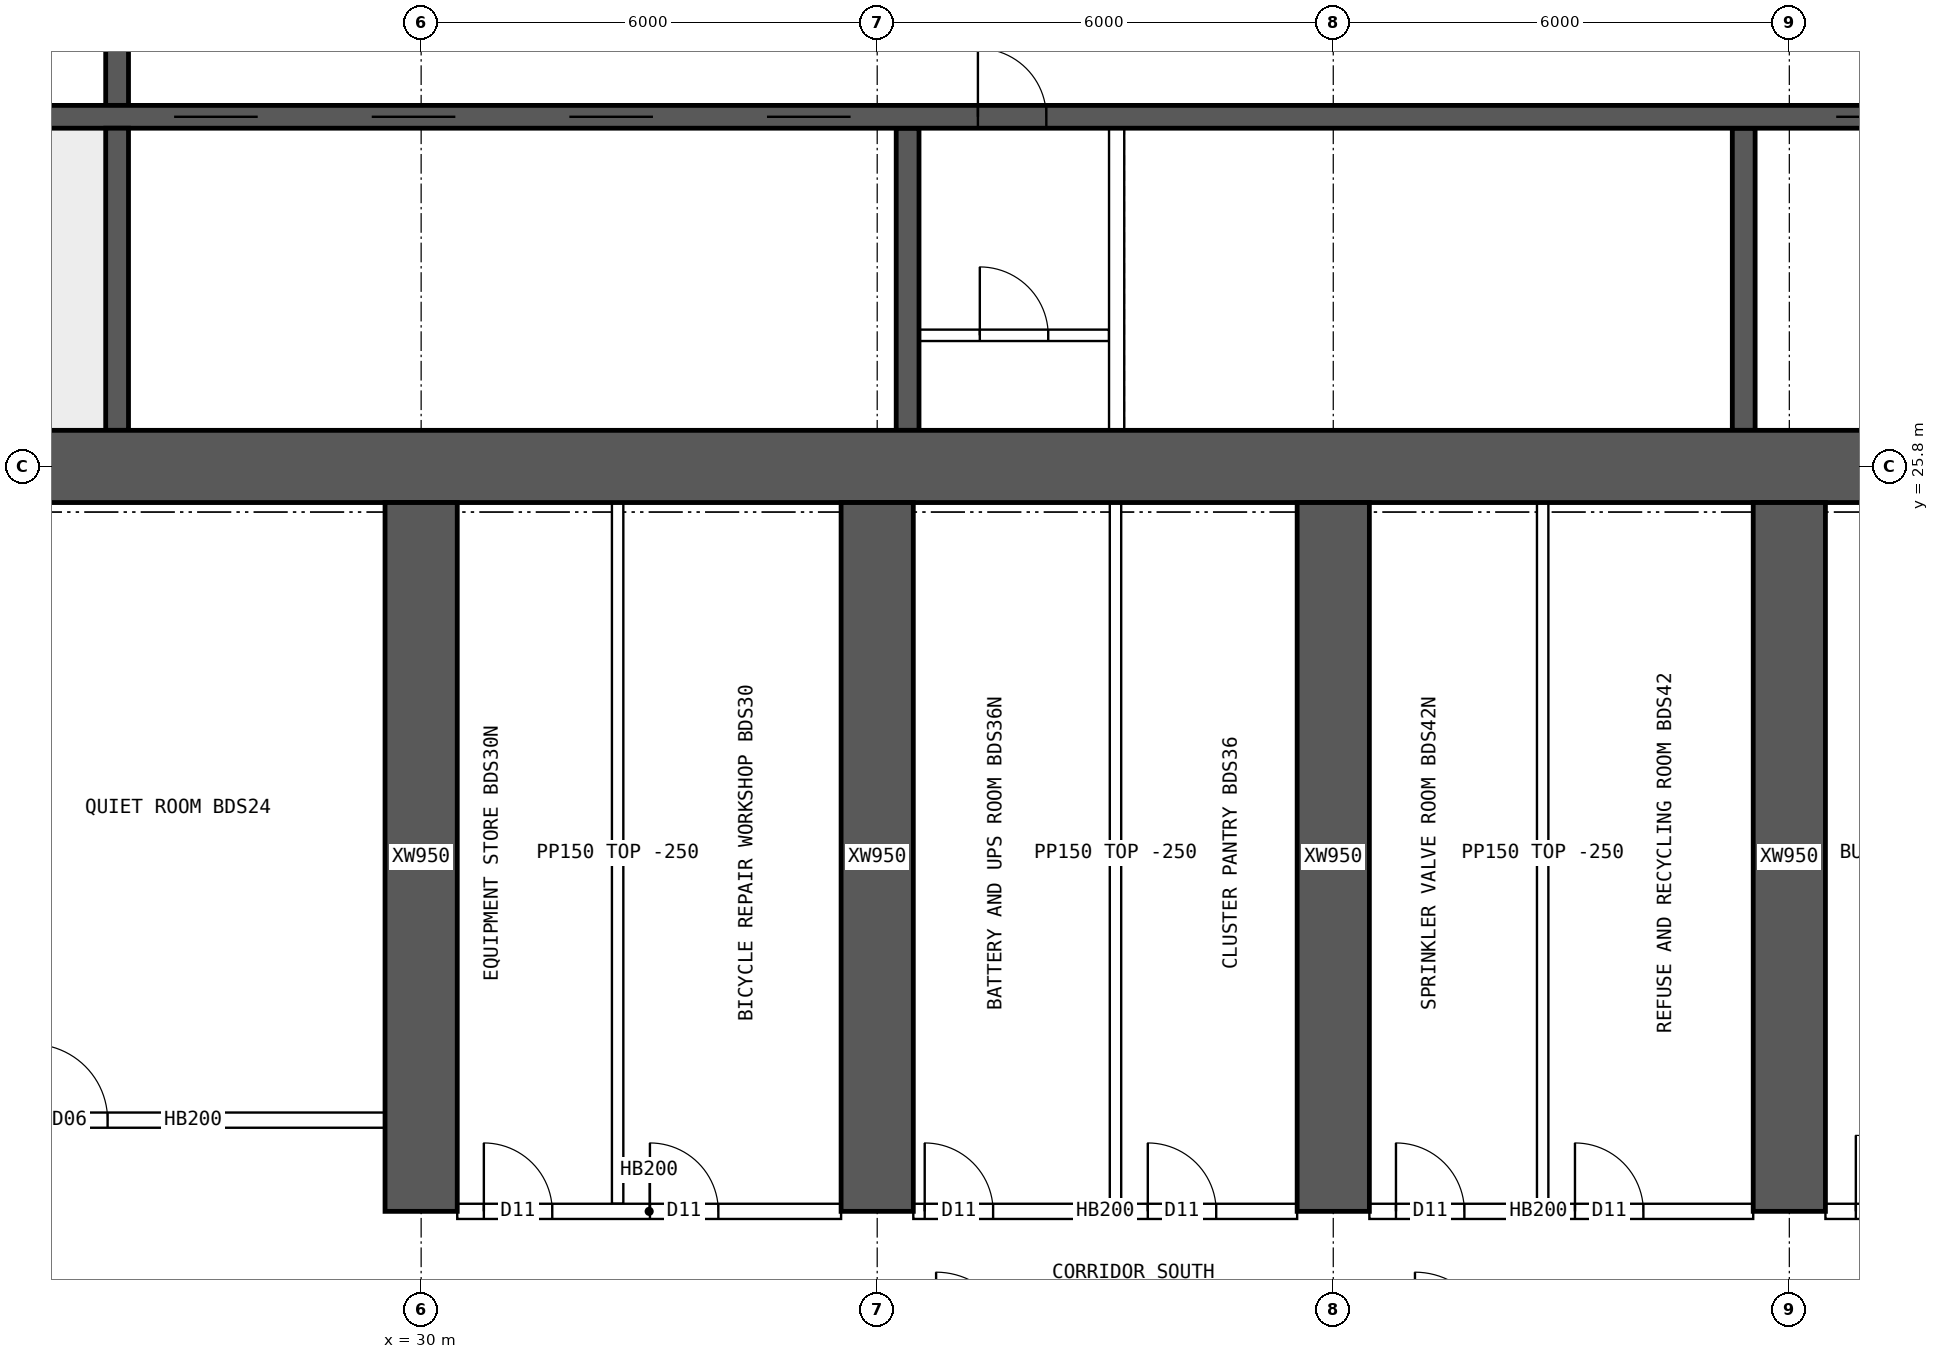
"""IFC4 building model, lengths in metres.
Left out: names, types, materials, properties, quantities, classifications, styles, units other than length and angle.
Written with IfcOpenShell. Run it as: python <this file> out.ifc"""

import sys

from ifc_helpers import new_model, si_unit, direction, frame, frame_2d, origin, place, context, subcontext, project, spatial, rectangle, extrude, element, fill, save


model = new_model("IFC4")
c1 = context("Model", 3, precision=1e-05, world=origin(), true_north=direction((0.0, 1.0)))
c2 = subcontext(c1, "Body", "Model", "MODEL_VIEW")
j1 = project(units=[si_unit("LENGTHUNIT", "METRE"), si_unit("PLANEANGLEUNIT", "RADIAN")], contexts=[c1])
p1 = place(None, origin())
s1 = spatial("IfcSite", under=j1, at=p1, CompositionType="ELEMENT")
p2 = place(p1, origin())
s2 = spatial("IfcBuilding", under=s1, at=p2, CompositionType="ELEMENT")
p3 = place(p2, frame((0.0, 0.0, 88.15)))
s3 = spatial("IfcBuildingStorey", under=s2, at=p3, CompositionType="ELEMENT", Elevation=88.15)
p4 = place(p3, frame((18.0, 25.8, 0.0), z_axis=(0.0, 0.0, 1.0), x_axis=(1.0, 0.0, 0.0)))
e1 = element("IfcWall", 1, at=p4, inside=s3, PredefinedType="SHEAR", context=c2, shape_type="SweptSolid", body=[
    extrude(rectangle(XDim=48.0, YDim=0.95, at=frame_2d((24.0, 0.0))), origin(), (0.0, 0.0, 1.0), 3.75),
])
p5 = place(p3, frame((18.475, 30.4, 0.0), z_axis=(0.0, 0.0, 1.0), x_axis=(1.0, 0.0, 0.0)))
e2 = element("IfcWall", 2, at=p5, inside=s3, PredefinedType="SHEAR", context=c2, shape_type="SweptSolid", body=[
    extrude(rectangle(XDim=47.05, YDim=0.3, at=frame_2d((23.525, 0.0))), origin(), (0.0, 0.0, 1.0), 3.75),
])
p6 = place(p5, frame((0.4, 0.0, 0.0)))
e3 = element("IfcOpeningElement", 3, at=p6, cuts=e2, PredefinedType="OPENING", context=c2, shape_type="SweptSolid", body=[
    extrude(rectangle(XDim=1.0, YDim=2.1, at=frame_2d((0.5, 1.05))), frame((0.0, 0.16, 0.0), z_axis=(0.0, -1.0, 0.0), x_axis=(1.0, 0.0, 0.0)), (0.0, 0.0, 1.0), 0.32),
])
p7 = place(p5, frame((45.65, 0.0, 0.0)))
e4 = element("IfcOpeningElement", 4, at=p7, cuts=e2, PredefinedType="OPENING", context=c2, shape_type="SweptSolid", body=[
    extrude(rectangle(XDim=1.0, YDim=2.1, at=frame_2d((0.5, 1.05))), frame((0.0, 0.16, 0.0), z_axis=(0.0, -1.0, 0.0), x_axis=(1.0, 0.0, 0.0)), (0.0, 0.0, 1.0), 0.32),
])
p8 = place(p5, frame((8.275, 0.0, 0.0)))
e5 = element("IfcOpeningElement", 5, at=p8, cuts=e2, PredefinedType="OPENING", context=c2, shape_type="SweptSolid", body=[
    extrude(rectangle(XDim=1.1, YDim=2.1, at=frame_2d((0.55, 1.05))), frame((0.0, 0.16, 0.0), z_axis=(0.0, -1.0, 0.0), x_axis=(1.0, 0.0, 0.0)), (0.0, 0.0, 1.0), 0.32),
])
p9 = place(p5, frame((10.875, 0.0, 0.0)))
e6 = element("IfcOpeningElement", 6, at=p9, cuts=e2, PredefinedType="OPENING", context=c2, shape_type="SweptSolid", body=[
    extrude(rectangle(XDim=1.1, YDim=2.1, at=frame_2d((0.55, 1.05))), frame((0.0, 0.16, 0.0), z_axis=(0.0, -1.0, 0.0), x_axis=(1.0, 0.0, 0.0)), (0.0, 0.0, 1.0), 0.32),
])
p10 = place(p5, frame((13.475, 0.0, 0.0)))
e7 = element("IfcOpeningElement", 7, at=p10, cuts=e2, PredefinedType="OPENING", context=c2, shape_type="SweptSolid", body=[
    extrude(rectangle(XDim=1.1, YDim=2.1, at=frame_2d((0.55, 1.05))), frame((0.0, 0.16, 0.0), z_axis=(0.0, -1.0, 0.0), x_axis=(1.0, 0.0, 0.0)), (0.0, 0.0, 1.0), 0.32),
])
p11 = place(p5, frame((16.075, 0.0, 0.0)))
e8 = element("IfcOpeningElement", 8, at=p11, cuts=e2, PredefinedType="OPENING", context=c2, shape_type="SweptSolid", body=[
    extrude(rectangle(XDim=1.1, YDim=2.1, at=frame_2d((0.55, 1.05))), frame((0.0, 0.16, 0.0), z_axis=(0.0, -1.0, 0.0), x_axis=(1.0, 0.0, 0.0)), (0.0, 0.0, 1.0), 0.32),
])
p12 = place(p5, frame((18.85, 0.0, 0.0)))
e9 = element("IfcOpeningElement", 9, at=p12, cuts=e2, PredefinedType="OPENING", context=c2, shape_type="SweptSolid", body=[
    extrude(rectangle(XDim=0.9, YDim=2.1, at=frame_2d((0.45, 1.05))), frame((0.0, 0.16, 0.0), z_axis=(0.0, -1.0, 0.0), x_axis=(1.0, 0.0, 0.0)), (0.0, 0.0, 1.0), 0.32),
])
p13 = place(p5, frame((30.142, 0.0, 0.0)))
e10 = element("IfcOpeningElement", 10, at=p13, cuts=e2, PredefinedType="OPENING", context=c2, shape_type="SweptSolid", body=[
    extrude(rectangle(XDim=1.1, YDim=2.1, at=frame_2d((0.55, 1.05))), frame((0.0, 0.16, 0.0), z_axis=(0.0, -1.0, 0.0), x_axis=(1.0, 0.0, 0.0)), (0.0, 0.0, 1.0), 0.32),
])
p14 = place(p5, frame((33.675, 0.0, 0.0)))
e11 = element("IfcOpeningElement", 11, at=p14, cuts=e2, PredefinedType="OPENING", context=c2, shape_type="SweptSolid", body=[
    extrude(rectangle(XDim=1.1, YDim=2.1, at=frame_2d((0.55, 1.05))), frame((0.0, 0.16, 0.0), z_axis=(0.0, -1.0, 0.0), x_axis=(1.0, 0.0, 0.0)), (0.0, 0.0, 1.0), 0.32),
])
p15 = place(p5, frame((37.208, 0.0, 0.0)))
e12 = element("IfcOpeningElement", 12, at=p15, cuts=e2, PredefinedType="OPENING", context=c2, shape_type="SweptSolid", body=[
    extrude(rectangle(XDim=1.1, YDim=2.1, at=frame_2d((0.55, 1.05))), frame((0.0, 0.16, 0.0), z_axis=(0.0, -1.0, 0.0), x_axis=(1.0, 0.0, 0.0)), (0.0, 0.0, 1.0), 0.32),
])
p16 = place(p3, frame((26.0, 26.275, 0.0), z_axis=(0.0, 0.0, 1.0), x_axis=(0.0, 1.0, 0.0)))
e13 = element("IfcWall", 13, at=p16, inside=s3, PredefinedType="SHEAR", context=c2, shape_type="SweptSolid", body=[
    extrude(rectangle(XDim=3.975, YDim=0.3, at=frame_2d((1.988, 0.0))), origin(), (0.0, 0.0, 1.0), 3.75),
])
p17 = place(p3, frame((26.0, 30.55, 0.0), z_axis=(0.0, 0.0, 1.0), x_axis=(0.0, 1.0, 0.0)))
e14 = element("IfcWall", 14, at=p17, inside=s3, PredefinedType="SHEAR", context=c2, shape_type="SweptSolid", body=[
    extrude(rectangle(XDim=3.9, YDim=0.3, at=frame_2d((1.95, 0.0))), origin(), (0.0, 0.0, 1.0), 3.75),
])
p18 = place(p17, frame((1.4, 0.0, 0.0)))
e15 = element("IfcOpeningElement", 15, at=p18, cuts=e14, PredefinedType="OPENING", context=c2, shape_type="SweptSolid", body=[
    extrude(rectangle(XDim=1.2, YDim=2.1, at=frame_2d((0.6, 1.05))), frame((0.0, 0.16, 0.0), z_axis=(0.0, -1.0, 0.0), x_axis=(1.0, 0.0, 0.0)), (0.0, 0.0, 1.0), 0.32),
])
for number, where, z_axis, x_axis in (
    (16, (36.4, 26.275, 0.0), (0.0, 0.0, 1.0), (0.0, 1.0, 0.0)),
    (17, (47.4, 26.275, 0.0), (0.0, 0.0, 1.0), (0.0, 1.0, 0.0)),
):
    element("IfcWall", number, at=place(p3, frame(where, z_axis=z_axis, x_axis=x_axis)), inside=s3, PredefinedType="SHEAR", context=c2, shape_type="SweptSolid", body=[
        extrude(rectangle(XDim=3.975, YDim=0.3, at=frame_2d((1.988, 0.0))), origin(), (0.0, 0.0, 1.0), 3.75),
    ])
for number, where, z_axis, x_axis in (
    (18, (30.0, 16.0, 0.0), (0.0, 0.0, 1.0), (0.0, 1.0, 0.0)),
    (19, (36.0, 16.0, 0.0), (0.0, 0.0, 1.0), (0.0, 1.0, 0.0)),
    (20, (42.0, 16.0, 0.0), (0.0, 0.0, 1.0), (0.0, 1.0, 0.0)),
    (21, (48.0, 16.0, 0.0), (0.0, 0.0, 1.0), (0.0, 1.0, 0.0)),
):
    element("IfcWall", number, at=place(p3, frame(where, z_axis=z_axis, x_axis=x_axis)), inside=s3, PredefinedType="SHEAR", context=c2, shape_type="SweptSolid", body=[
        extrude(rectangle(XDim=9.325, YDim=0.95, at=frame_2d((4.663, 0.0))), origin(), (0.0, 0.0, 1.0), 3.75),
    ])
p19 = place(p3, frame((36.55, 27.525, 0.0), z_axis=(0.0, 0.0, 1.0), x_axis=(1.0, 0.0, 0.0)))
e22 = element("IfcWall", 22, at=p19, inside=s3, PredefinedType="SOLIDWALL", context=c2, shape_type="SweptSolid", body=[
    extrude(rectangle(XDim=2.5, YDim=0.15, at=frame_2d((1.25, 0.0))), origin(), (0.0, 0.0, 1.0), 3.5),
])
p20 = place(p19, frame((0.8, 0.0, 0.0)))
e23 = element("IfcOpeningElement", 23, at=p20, cuts=e22, PredefinedType="OPENING", context=c2, shape_type="SweptSolid", body=[
    extrude(rectangle(XDim=0.9, YDim=2.1, at=frame_2d((0.45, 1.05))), frame((0.0, 0.085, 0.0), z_axis=(0.0, -1.0, 0.0), x_axis=(1.0, 0.0, 0.0)), (0.0, 0.0, 1.0), 0.17),
])
p21 = place(p3, frame((39.15, 26.275, 0.0), z_axis=(0.0, 0.0, 1.0), x_axis=(0.0, 1.0, 0.0)))
e24 = element("IfcWall", 24, at=p21, inside=s3, PredefinedType="SOLIDWALL", context=c2, shape_type="SweptSolid", body=[
    extrude(rectangle(XDim=3.975, YDim=0.2, at=frame_2d((1.988, 0.0))), origin(), (0.0, 0.0, 1.0), 3.5),
])
p22 = place(p3, frame((30.475, 16.0, 0.0), z_axis=(0.0, 0.0, 1.0), x_axis=(1.0, 0.0, 0.0)))
e25 = element("IfcWall", 25, at=p22, inside=s3, PredefinedType="SOLIDWALL", context=c2, shape_type="SweptSolid", body=[
    extrude(rectangle(XDim=5.05, YDim=0.2, at=frame_2d((2.525, 0.0))), origin(), (0.0, 0.0, 1.0), 3.5),
])
p23 = place(p22, frame((0.35, 0.0, 0.0)))
e26 = element("IfcOpeningElement", 26, at=p23, cuts=e25, PredefinedType="OPENING", context=c2, shape_type="SweptSolid", body=[
    extrude(rectangle(XDim=0.9, YDim=2.1, at=frame_2d((0.45, 1.05))), frame((0.0, 0.11, 0.0), z_axis=(0.0, -1.0, 0.0), x_axis=(1.0, 0.0, 0.0)), (0.0, 0.0, 1.0), 0.22),
])
p24 = place(p22, frame((2.535, 0.0, 0.0)))
e27 = element("IfcOpeningElement", 27, at=p24, cuts=e25, PredefinedType="OPENING", context=c2, shape_type="SweptSolid", body=[
    extrude(rectangle(XDim=0.9, YDim=2.1, at=frame_2d((0.45, 1.05))), frame((0.0, 0.11, 0.0), z_axis=(0.0, -1.0, 0.0), x_axis=(1.0, 0.0, 0.0)), (0.0, 0.0, 1.0), 0.22),
])
p25 = place(p3, frame((36.475, 16.0, 0.0), z_axis=(0.0, 0.0, 1.0), x_axis=(1.0, 0.0, 0.0)))
e28 = element("IfcWall", 28, at=p25, inside=s3, PredefinedType="SOLIDWALL", context=c2, shape_type="SweptSolid", body=[
    extrude(rectangle(XDim=5.05, YDim=0.2, at=frame_2d((2.525, 0.0))), origin(), (0.0, 0.0, 1.0), 3.5),
])
p26 = place(p25, frame((0.15, 0.0, 0.0)))
e29 = element("IfcOpeningElement", 29, at=p26, cuts=e28, PredefinedType="OPENING", context=c2, shape_type="SweptSolid", body=[
    extrude(rectangle(XDim=0.9, YDim=2.1, at=frame_2d((0.45, 1.05))), frame((0.0, 0.11, 0.0), z_axis=(0.0, -1.0, 0.0), x_axis=(1.0, 0.0, 0.0)), (0.0, 0.0, 1.0), 0.22),
])
p27 = place(p25, frame((3.085, 0.0, 0.0)))
e30 = element("IfcOpeningElement", 30, at=p27, cuts=e28, PredefinedType="OPENING", context=c2, shape_type="SweptSolid", body=[
    extrude(rectangle(XDim=0.9, YDim=2.1, at=frame_2d((0.45, 1.05))), frame((0.0, 0.11, 0.0), z_axis=(0.0, -1.0, 0.0), x_axis=(1.0, 0.0, 0.0)), (0.0, 0.0, 1.0), 0.22),
])
p28 = place(p3, frame((42.475, 16.0, 0.0), z_axis=(0.0, 0.0, 1.0), x_axis=(1.0, 0.0, 0.0)))
e31 = element("IfcWall", 31, at=p28, inside=s3, PredefinedType="SOLIDWALL", context=c2, shape_type="SweptSolid", body=[
    extrude(rectangle(XDim=5.05, YDim=0.2, at=frame_2d((2.525, 0.0))), origin(), (0.0, 0.0, 1.0), 3.5),
])
p29 = place(p28, frame((0.35, 0.0, 0.0)))
e32 = element("IfcOpeningElement", 32, at=p29, cuts=e31, PredefinedType="OPENING", context=c2, shape_type="SweptSolid", body=[
    extrude(rectangle(XDim=0.9, YDim=2.1, at=frame_2d((0.45, 1.05))), frame((0.0, 0.11, 0.0), z_axis=(0.0, -1.0, 0.0), x_axis=(1.0, 0.0, 0.0)), (0.0, 0.0, 1.0), 0.22),
])
p30 = place(p28, frame((2.705, 0.0, 0.0)))
e33 = element("IfcOpeningElement", 33, at=p30, cuts=e31, PredefinedType="OPENING", context=c2, shape_type="SweptSolid", body=[
    extrude(rectangle(XDim=0.9, YDim=2.1, at=frame_2d((0.45, 1.05))), frame((0.0, 0.11, 0.0), z_axis=(0.0, -1.0, 0.0), x_axis=(1.0, 0.0, 0.0)), (0.0, 0.0, 1.0), 0.22),
])
p31 = place(p3, frame((48.475, 16.0, 0.0), z_axis=(0.0, 0.0, 1.0), x_axis=(1.0, 0.0, 0.0)))
e34 = element("IfcWall", 34, at=p31, inside=s3, PredefinedType="SOLIDWALL", context=c2, shape_type="SweptSolid", body=[
    extrude(rectangle(XDim=5.05, YDim=0.2, at=frame_2d((2.525, 0.0))), origin(), (0.0, 0.0, 1.0), 3.5),
])
p32 = place(p31, frame((0.4, 0.0, 0.0)))
e35 = element("IfcOpeningElement", 35, at=p32, cuts=e34, PredefinedType="OPENING", context=c2, shape_type="SweptSolid", body=[
    extrude(rectangle(XDim=1.0, YDim=2.1, at=frame_2d((0.5, 1.05))), frame((0.0, 0.11, 0.0), z_axis=(0.0, -1.0, 0.0), x_axis=(1.0, 0.0, 0.0)), (0.0, 0.0, 1.0), 0.22),
])
p33 = place(p3, frame((24.475, 17.2, 0.0), z_axis=(0.0, 0.0, 1.0), x_axis=(1.0, 0.0, 0.0)))
e36 = element("IfcWall", 36, at=p33, inside=s3, PredefinedType="SOLIDWALL", context=c2, shape_type="SweptSolid", body=[
    extrude(rectangle(XDim=5.05, YDim=0.2, at=frame_2d((2.525, 0.0))), origin(), (0.0, 0.0, 1.0), 3.5),
])
p34 = place(p33, frame((0.4, 0.0, 0.0)))
e37 = element("IfcOpeningElement", 37, at=p34, cuts=e36, PredefinedType="OPENING", context=c2, shape_type="SweptSolid", body=[
    extrude(rectangle(XDim=1.0, YDim=2.1, at=frame_2d((0.5, 1.05))), frame((0.0, 0.11, 0.0), z_axis=(0.0, -1.0, 0.0), x_axis=(1.0, 0.0, 0.0)), (0.0, 0.0, 1.0), 0.22),
])
for number, where, z_axis, x_axis in (
    (38, (32.585, 16.1, 0.0), (0.0, 0.0, 1.0), (0.0, 1.0, 0.0)),
    (39, (39.135, 16.1, 0.0), (0.0, 0.0, 1.0), (0.0, 1.0, 0.0)),
    (40, (44.755, 16.1, 0.0), (0.0, 0.0, 1.0), (0.0, 1.0, 0.0)),
):
    element("IfcWall", number, at=place(p3, frame(where, z_axis=z_axis, x_axis=x_axis)), inside=s3, PredefinedType="PARTITIONING", context=c2, shape_type="SweptSolid", body=[
        extrude(rectangle(XDim=9.225, YDim=0.15, at=frame_2d((4.612, 0.0))), origin(), (0.0, 0.0, 1.0), 3.5),
    ])
p35 = place(p8, origin())
e41 = element("IfcDoor", 41, at=p35, inside=s3, OperationType="DOUBLE_DOOR_SLIDING", PredefinedType="DOOR", context=c2, shape_type="SweptSolid", body=[
    extrude(rectangle(XDim=1.1, YDim=2.1, at=frame_2d((0.55, 1.05))), frame((0.0, 0.025, 0.0), z_axis=(0.0, -1.0, 0.0), x_axis=(1.0, 0.0, 0.0)), (0.0, 0.0, 1.0), 0.05),
])
fill(e5, e41)
p36 = place(p9, origin())
e42 = element("IfcDoor", 42, at=p36, inside=s3, OperationType="DOUBLE_DOOR_SLIDING", PredefinedType="DOOR", context=c2, shape_type="SweptSolid", body=[
    extrude(rectangle(XDim=1.1, YDim=2.1, at=frame_2d((0.55, 1.05))), frame((0.0, 0.025, 0.0), z_axis=(0.0, -1.0, 0.0), x_axis=(1.0, 0.0, 0.0)), (0.0, 0.0, 1.0), 0.05),
])
fill(e6, e42)
p37 = place(p10, origin())
e43 = element("IfcDoor", 43, at=p37, inside=s3, OperationType="DOUBLE_DOOR_SLIDING", PredefinedType="DOOR", context=c2, shape_type="SweptSolid", body=[
    extrude(rectangle(XDim=1.1, YDim=2.1, at=frame_2d((0.55, 1.05))), frame((0.0, 0.025, 0.0), z_axis=(0.0, -1.0, 0.0), x_axis=(1.0, 0.0, 0.0)), (0.0, 0.0, 1.0), 0.05),
])
fill(e7, e43)
p38 = place(p11, origin())
e44 = element("IfcDoor", 44, at=p38, inside=s3, OperationType="DOUBLE_DOOR_SLIDING", PredefinedType="DOOR", context=c2, shape_type="SweptSolid", body=[
    extrude(rectangle(XDim=1.1, YDim=2.1, at=frame_2d((0.55, 1.05))), frame((0.0, 0.025, 0.0), z_axis=(0.0, -1.0, 0.0), x_axis=(1.0, 0.0, 0.0)), (0.0, 0.0, 1.0), 0.05),
])
fill(e8, e44)
p39 = place(p20, origin())
e45 = element("IfcDoor", 45, at=p39, inside=s3, OperationType="SINGLE_SWING_LEFT", PredefinedType="DOOR", context=c2, shape_type="SweptSolid", body=[
    extrude(rectangle(XDim=0.9, YDim=2.1, at=frame_2d((0.45, 1.05))), frame((0.0, 0.025, 0.0), z_axis=(0.0, -1.0, 0.0), x_axis=(1.0, 0.0, 0.0)), (0.0, 0.0, 1.0), 0.05),
])
fill(e23, e45)
p40 = place(p12, origin())
e46 = element("IfcDoor", 46, at=p40, inside=s3, OperationType="SINGLE_SWING_LEFT", PredefinedType="DOOR", context=c2, shape_type="SweptSolid", body=[
    extrude(rectangle(XDim=0.9, YDim=2.1, at=frame_2d((0.45, 1.05))), frame((0.0, 0.025, 0.0), z_axis=(0.0, -1.0, 0.0), x_axis=(1.0, 0.0, 0.0)), (0.0, 0.0, 1.0), 0.05),
])
fill(e9, e46)
p41 = place(p13, origin())
e47 = element("IfcDoor", 47, at=p41, inside=s3, OperationType="DOUBLE_DOOR_SLIDING", PredefinedType="DOOR", context=c2, shape_type="SweptSolid", body=[
    extrude(rectangle(XDim=1.1, YDim=2.1, at=frame_2d((0.55, 1.05))), frame((0.0, 0.025, 0.0), z_axis=(0.0, -1.0, 0.0), x_axis=(1.0, 0.0, 0.0)), (0.0, 0.0, 1.0), 0.05),
])
fill(e10, e47)
p42 = place(p34, origin())
e48 = element("IfcDoor", 48, at=p42, inside=s3, OperationType="SINGLE_SWING_LEFT", PredefinedType="DOOR", context=c2, shape_type="SweptSolid", body=[
    extrude(rectangle(XDim=1.0, YDim=2.1, at=frame_2d((0.5, 1.05))), frame((0.0, 0.025, 0.0), z_axis=(0.0, -1.0, 0.0), x_axis=(1.0, 0.0, 0.0)), (0.0, 0.0, 1.0), 0.05),
])
fill(e37, e48)
p43 = place(p23, origin())
e49 = element("IfcDoor", 49, at=p43, inside=s3, OperationType="SINGLE_SWING_LEFT", PredefinedType="DOOR", context=c2, shape_type="SweptSolid", body=[
    extrude(rectangle(XDim=0.9, YDim=2.1, at=frame_2d((0.45, 1.05))), frame((0.0, 0.025, 0.0), z_axis=(0.0, -1.0, 0.0), x_axis=(1.0, 0.0, 0.0)), (0.0, 0.0, 1.0), 0.05),
])
fill(e26, e49)
p44 = place(p24, origin())
e50 = element("IfcDoor", 50, at=p44, inside=s3, OperationType="SINGLE_SWING_LEFT", PredefinedType="DOOR", context=c2, shape_type="SweptSolid", body=[
    extrude(rectangle(XDim=0.9, YDim=2.1, at=frame_2d((0.45, 1.05))), frame((0.0, 0.025, 0.0), z_axis=(0.0, -1.0, 0.0), x_axis=(1.0, 0.0, 0.0)), (0.0, 0.0, 1.0), 0.05),
])
fill(e27, e50)
p45 = place(p26, origin())
e51 = element("IfcDoor", 51, at=p45, inside=s3, OperationType="SINGLE_SWING_LEFT", PredefinedType="DOOR", context=c2, shape_type="SweptSolid", body=[
    extrude(rectangle(XDim=0.9, YDim=2.1, at=frame_2d((0.45, 1.05))), frame((0.0, 0.025, 0.0), z_axis=(0.0, -1.0, 0.0), x_axis=(1.0, 0.0, 0.0)), (0.0, 0.0, 1.0), 0.05),
])
fill(e29, e51)
p46 = place(p27, origin())
e52 = element("IfcDoor", 52, at=p46, inside=s3, OperationType="SINGLE_SWING_LEFT", PredefinedType="DOOR", context=c2, shape_type="SweptSolid", body=[
    extrude(rectangle(XDim=0.9, YDim=2.1, at=frame_2d((0.45, 1.05))), frame((0.0, 0.025, 0.0), z_axis=(0.0, -1.0, 0.0), x_axis=(1.0, 0.0, 0.0)), (0.0, 0.0, 1.0), 0.05),
])
fill(e30, e52)
p47 = place(p29, origin())
e53 = element("IfcDoor", 53, at=p47, inside=s3, OperationType="SINGLE_SWING_LEFT", PredefinedType="DOOR", context=c2, shape_type="SweptSolid", body=[
    extrude(rectangle(XDim=0.9, YDim=2.1, at=frame_2d((0.45, 1.05))), frame((0.0, 0.025, 0.0), z_axis=(0.0, -1.0, 0.0), x_axis=(1.0, 0.0, 0.0)), (0.0, 0.0, 1.0), 0.05),
])
fill(e32, e53)
p48 = place(p30, origin())
e54 = element("IfcDoor", 54, at=p48, inside=s3, OperationType="SINGLE_SWING_LEFT", PredefinedType="DOOR", context=c2, shape_type="SweptSolid", body=[
    extrude(rectangle(XDim=0.9, YDim=2.1, at=frame_2d((0.45, 1.05))), frame((0.0, 0.025, 0.0), z_axis=(0.0, -1.0, 0.0), x_axis=(1.0, 0.0, 0.0)), (0.0, 0.0, 1.0), 0.05),
])
fill(e33, e54)
p49 = place(p32, origin())
e55 = element("IfcDoor", 55, at=p49, inside=s3, OperationType="SINGLE_SWING_LEFT", PredefinedType="DOOR", context=c2, shape_type="SweptSolid", body=[
    extrude(rectangle(XDim=1.0, YDim=2.1, at=frame_2d((0.5, 1.05))), frame((0.0, 0.025, 0.0), z_axis=(0.0, -1.0, 0.0), x_axis=(1.0, 0.0, 0.0)), (0.0, 0.0, 1.0), 0.05),
])
fill(e35, e55)
save(model, sys.argv[1])
